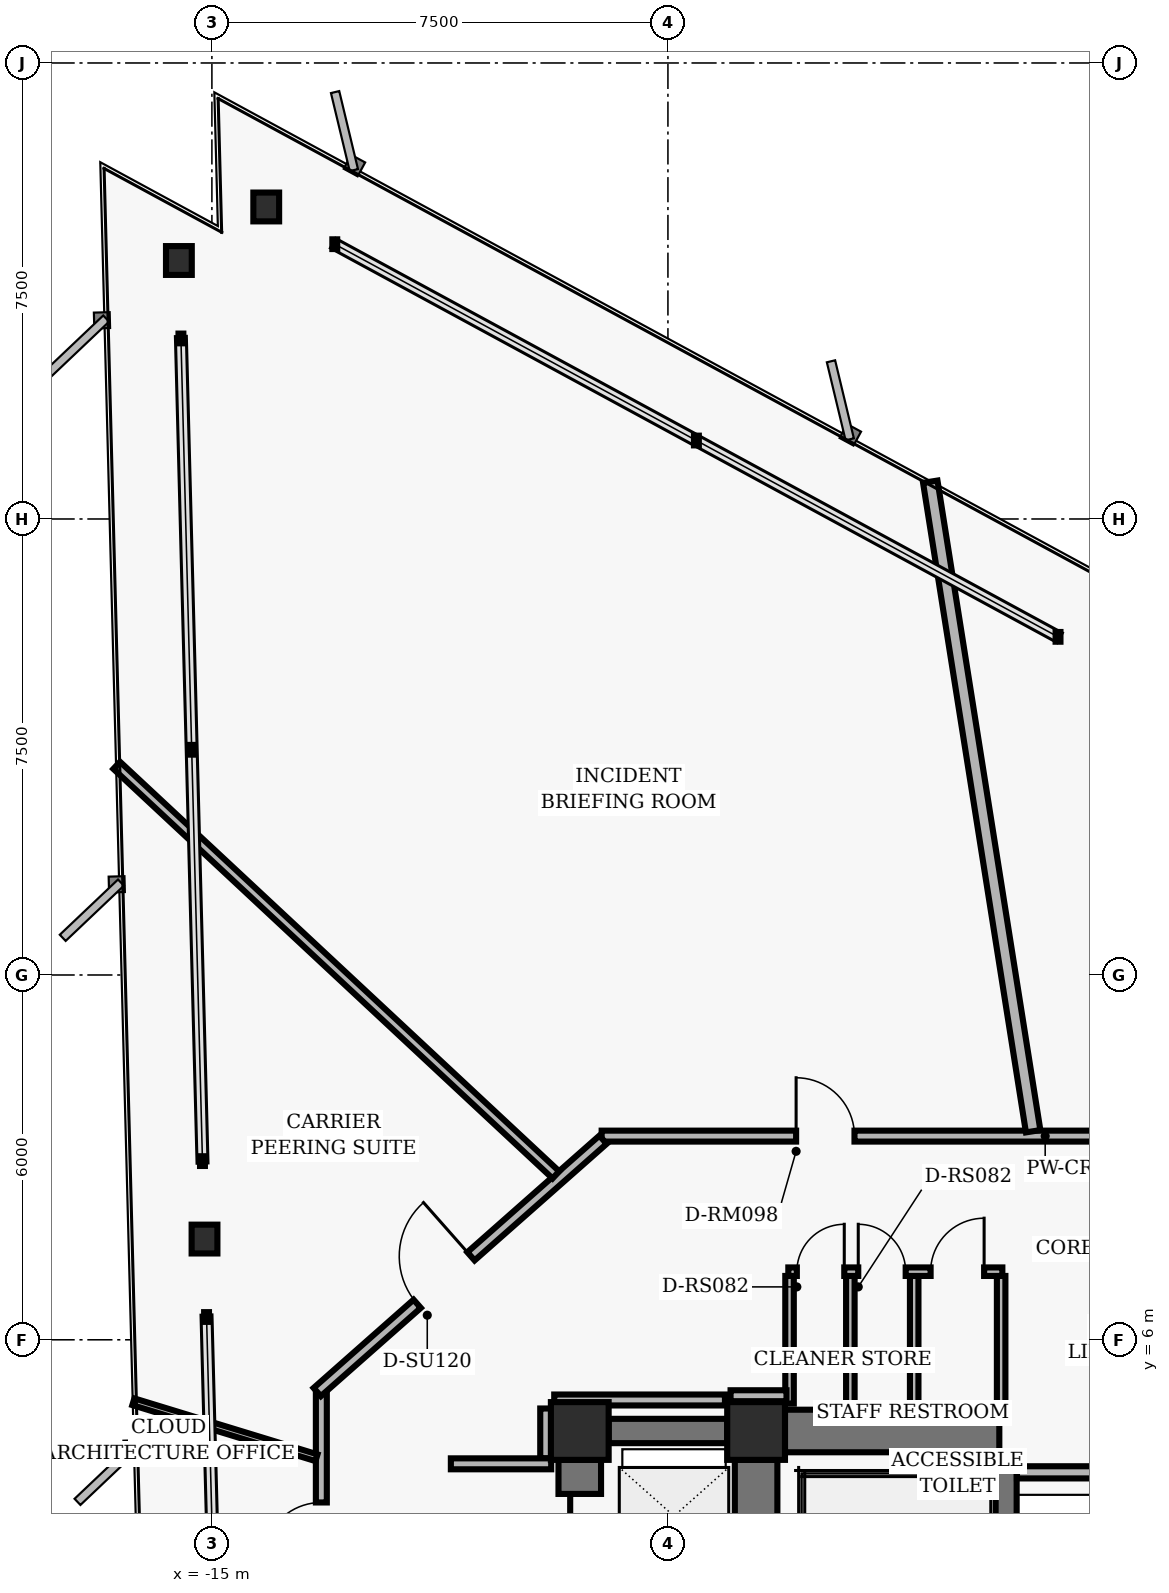
"""IFC4 building model, lengths in metres.
Left out: names, types, materials, properties, quantities, classifications, styles, units other than length and angle.
Written with IfcOpenShell. Run it as: python <this file> out.ifc"""

import sys

from ifc_helpers import new_model, si_unit, direction, frame, frame_2d, origin, origin_2d, place, context, subcontext, project, spatial, rectangle, hollow_rectangle, i_section, extrude, element, fill, save


model = new_model("IFC4")
c1 = context("Model", 3, precision=1e-05, world=origin(), true_north=direction((0.0, 1.0)))
c2 = subcontext(c1, "Body", "Model", "MODEL_VIEW")
j1 = project(units=[si_unit("LENGTHUNIT", "METRE"), si_unit("PLANEANGLEUNIT", "RADIAN")], contexts=[c1])
p1 = place(None, origin())
s1 = spatial("IfcSite", under=j1, at=p1, CompositionType="ELEMENT")
p2 = place(p1, origin())
s2 = spatial("IfcBuilding", under=s1, at=p2, CompositionType="ELEMENT")
p3 = place(p2, frame((0.0, 0.0, 32.32)))
s3 = spatial("IfcBuildingStorey", under=s2, at=p3, CompositionType="ELEMENT", Elevation=32.32)
for number, where, z_axis, x_axis in (
    (1, (-6.05, 4.5, 0.0), (0.0, 0.0, 1.0), (1.0, 0.0, 0.0)),
    (2, (-8.95, 4.5, 0.0), (0.0, 0.0, 1.0), (1.0, 0.0, 0.0)),
):
    element("IfcColumn", number, at=place(p3, frame(where, z_axis=z_axis, x_axis=x_axis)), inside=s3, PredefinedType="COLUMN", context=c2, shape_type="SweptSolid", body=[
        extrude(hollow_rectangle(XDim=0.95, YDim=0.95, WallThickness=0.06, InnerFilletRadius=0.02, OuterFilletRadius=0.04, at=origin_2d()), origin(), (0.0, 0.0, 1.0), 3.36),
    ])
p4 = place(p3, frame((-6.05, 0.475, 0.0), z_axis=(0.0, 0.0, 1.0), x_axis=(0.0, 1.0, 0.0)))
e3 = element("IfcWall", 3, at=p4, inside=s3, PredefinedType="SHEAR", context=c2, shape_type="SweptSolid", body=[
    extrude(rectangle(XDim=3.55, YDim=0.7, at=frame_2d((1.775, 0.0))), origin(), (0.0, 0.0, 1.0), 3.098),
])
p5 = place(p3, frame((-1.94, -4.1, 0.0), z_axis=(0.0, 0.0, 1.0), x_axis=(0.0, 1.0, 0.0)))
e4 = element("IfcWall", 4, at=p5, inside=s3, PredefinedType="SHEAR", context=c2, shape_type="SweptSolid", body=[
    extrude(rectangle(XDim=8.2, YDim=0.35, at=frame_2d((4.1, 0.0))), origin(), (0.0, 0.0, 1.0), 3.098),
])
p6 = place(p3, frame((-5.575, 4.5, 0.0), z_axis=(0.0, 0.0, 1.0), x_axis=(1.0, 0.0, 0.0)))
e5 = element("IfcWall", 5, at=p6, inside=s3, PredefinedType="SHEAR", context=c2, shape_type="SweptSolid", body=[
    extrude(rectangle(XDim=3.525, YDim=0.7, at=frame_2d((1.762, 0.0))), origin(), (0.0, 0.0, 1.0), 3.098),
])
p7 = place(p3, frame((-8.95, -3.825, 0.0), z_axis=(0.0, 0.0, 1.0), x_axis=(0.0, 1.0, 0.0)))
e6 = element("IfcWall", 6, at=p7, inside=s3, PredefinedType="SHEAR", context=c2, shape_type="SweptSolid", body=[
    extrude(rectangle(XDim=7.85, YDim=0.7, at=frame_2d((3.925, 0.0))), origin(), (0.0, 0.0, 1.0), 3.098),
])
p8 = place(p7, frame((0.55, 0.0, 0.0)))
e7 = element("IfcOpeningElement", 7, at=p8, cuts=e6, PredefinedType="OPENING", context=c2, shape_type="SweptSolid", body=[
    extrude(rectangle(XDim=1.06, YDim=2.04, at=frame_2d((0.53, 1.02))), frame((0.0, 0.36, 0.0), z_axis=(0.0, -1.0, 0.0), x_axis=(1.0, 0.0, 0.0)), (0.0, 0.0, 1.0), 0.72),
])
p9 = place(p7, frame((3.395, 0.0, 0.0)))
e8 = element("IfcOpeningElement", 8, at=p9, cuts=e6, PredefinedType="OPENING", context=c2, shape_type="SweptSolid", body=[
    extrude(rectangle(XDim=1.06, YDim=2.04, at=frame_2d((0.53, 1.02))), frame((0.0, 0.36, 0.0), z_axis=(0.0, -1.0, 0.0), x_axis=(1.0, 0.0, 0.0)), (0.0, 0.0, 1.0), 0.72),
])
p10 = place(p7, frame((6.23, 0.0, 0.0)))
e9 = element("IfcOpeningElement", 9, at=p10, cuts=e6, PredefinedType="OPENING", context=c2, shape_type="SweptSolid", body=[
    extrude(rectangle(XDim=1.06, YDim=2.04, at=frame_2d((0.53, 1.02))), frame((0.0, 0.36, 0.0), z_axis=(0.0, -1.0, 0.0), x_axis=(1.0, 0.0, 0.0)), (0.0, 0.0, 1.0), 0.72),
])
p11 = place(p3, frame((-8.475, 4.5, 0.0), z_axis=(0.0, 0.0, 1.0), x_axis=(1.0, 0.0, 0.0)))
e10 = element("IfcWall", 10, at=p11, inside=s3, PredefinedType="SHEAR", context=c2, shape_type="SweptSolid", body=[
    extrude(rectangle(XDim=1.95, YDim=0.4, at=frame_2d((0.975, 0.0))), origin(), (0.0, 0.0, 1.0), 3.098),
])
for number, where, z_axis, x_axis in (
    (11, (-14.106, 24.632, 0.0), (0.0, 0.0, 1.0), (1.0, 0.0, 0.0)),
    (12, (-15.543, 23.751, 0.0), (0.0, 0.0, 1.0), (1.0, 0.0, 0.0)),
    (13, (-15.121, 7.657, 0.0), (0.0, 0.0, 1.0), (1.0, 0.0, 0.0)),
):
    element("IfcColumn", number, at=place(p3, frame(where, z_axis=z_axis, x_axis=x_axis)), inside=s3, PredefinedType="COLUMN", context=c2, shape_type="SweptSolid", body=[
        extrude(i_section(OverallWidth=0.424, OverallDepth=0.474, WebThickness=0.048, FlangeThickness=0.077, FilletRadius=0.025, at=origin_2d()), origin(), (0.0, 0.0, 1.0), 3.36),
    ])
p12 = place(p3, frame((-1.76, 3.82, 0.0), z_axis=(0.0, 0.0, 1.0), x_axis=(1.0, 0.0, 0.0)))
e14 = element("IfcWall", 14, at=p12, inside=s3, PredefinedType="PARTITIONING", context=c2, shape_type="SweptSolid", body=[
    extrude(rectangle(XDim=3.52, YDim=0.2, at=frame_2d((1.76, 0.0))), origin(), (0.0, 0.0, 1.0), 3.073),
])
for number, where, z_axis, x_axis in (
    (15, (-5.5, 4.95, 0.0), (0.0, 0.0, 1.0), (0.0, 1.0, 0.0)),
    (16, (-4.5, 4.95, 0.0), (0.0, 0.0, 1.0), (0.0, 1.0, 0.0)),
    (17, (-3.45, 4.95, 0.0), (0.0, 0.0, 1.0), (0.0, 1.0, 0.0)),
    (18, (-2.02, 4.95, 0.0), (0.0, 0.0, 1.0), (0.0, 1.0, 0.0)),
):
    element("IfcWall", number, at=place(p3, frame(where, z_axis=z_axis, x_axis=x_axis)), inside=s3, PredefinedType="PARTITIONING", context=c2, shape_type="SweptSolid", body=[
        extrude(rectangle(XDim=2.1, YDim=0.14, at=frame_2d((1.05, 0.0))), origin(), (0.0, 0.0, 1.0), 3.073),
    ])
p13 = place(p3, frame((-5.52, 7.12, 0.0), z_axis=(0.0, 0.0, 1.0), x_axis=(1.0, 0.0, 0.0)))
e19 = element("IfcWall", 19, at=p13, inside=s3, PredefinedType="PARTITIONING", context=c2, shape_type="SweptSolid", body=[
    extrude(rectangle(XDim=3.52, YDim=0.14, at=frame_2d((1.76, 0.0))), origin(), (0.0, 0.0, 1.0), 3.073),
])
p14 = place(p13, frame((0.14, 0.0, 0.0)))
e20 = element("IfcOpeningElement", 20, at=p14, cuts=e19, PredefinedType="OPENING", context=c2, shape_type="SweptSolid", body=[
    extrude(rectangle(XDim=0.78, YDim=2.01, at=frame_2d((0.39, 1.005))), frame((0.0, 0.08, 0.0), z_axis=(0.0, -1.0, 0.0), x_axis=(1.0, 0.0, 0.0)), (0.0, 0.0, 1.0), 0.16),
])
p15 = place(p13, frame((1.15, 0.0, 0.0)))
e21 = element("IfcOpeningElement", 21, at=p15, cuts=e19, PredefinedType="OPENING", context=c2, shape_type="SweptSolid", body=[
    extrude(rectangle(XDim=0.78, YDim=2.01, at=frame_2d((0.39, 1.005))), frame((0.0, 0.08, 0.0), z_axis=(0.0, -1.0, 0.0), x_axis=(1.0, 0.0, 0.0)), (0.0, 0.0, 1.0), 0.16),
])
p16 = place(p13, frame((2.34, 0.0, 0.0)))
e22 = element("IfcOpeningElement", 22, at=p16, cuts=e19, PredefinedType="OPENING", context=c2, shape_type="SweptSolid", body=[
    extrude(rectangle(XDim=0.88, YDim=2.02, at=frame_2d((0.44, 1.01))), frame((0.0, 0.08, 0.0), z_axis=(0.0, -1.0, 0.0), x_axis=(1.0, 0.0, 0.0)), (0.0, 0.0, 1.0), 0.16),
])
p17 = place(p3, frame((-8.59, 9.35, 0.0), z_axis=(0.0, 0.0, 1.0), x_axis=(1.0, 0.0, 0.0)))
e23 = element("IfcWall", 23, at=p17, inside=s3, PredefinedType="PARTITIONING", context=c2, shape_type="SweptSolid", body=[
    extrude(rectangle(XDim=17.18, YDim=0.18, at=frame_2d((8.59, 0.0))), origin(), (0.0, 0.0, 1.0), 2.587),
])
p18 = place(p17, frame((10.43, 0.0, 0.0)))
e24 = element("IfcOpeningElement", 24, at=p18, cuts=e23, PredefinedType="OPENING", context=c2, shape_type="SweptSolid", body=[
    extrude(rectangle(XDim=0.96, YDim=2.02, at=frame_2d((0.48, 1.01))), frame((0.0, 0.1, 0.0), z_axis=(0.0, -1.0, 0.0), x_axis=(1.0, 0.0, 0.0)), (0.0, 0.0, 1.0), 0.2),
])
p19 = place(p17, frame((3.198, 0.0, 0.0)))
e25 = element("IfcOpeningElement", 25, at=p19, cuts=e23, PredefinedType="OPENING", context=c2, shape_type="SweptSolid", body=[
    extrude(rectangle(XDim=0.96, YDim=2.02, at=frame_2d((0.48, 1.01))), frame((0.0, 0.1, 0.0), z_axis=(0.0, -1.0, 0.0), x_axis=(1.0, 0.0, 0.0)), (0.0, 0.0, 1.0), 0.2),
])
p20 = place(p3, frame((-13.2, -5.11, 0.0), z_axis=(0.0, 0.0, 1.0), x_axis=(0.0, 1.0, 0.0)))
e26 = element("IfcWall", 26, at=p20, inside=s3, PredefinedType="PARTITIONING", context=c2, shape_type="SweptSolid", body=[
    extrude(rectangle(XDim=10.22, YDim=0.18, at=frame_2d((5.11, 0.0))), origin(), (0.0, 0.0, 1.0), 2.587),
])
p21 = place(p20, frame((3.02, 0.0, 0.0)))
e27 = element("IfcOpeningElement", 27, at=p21, cuts=e26, PredefinedType="OPENING", context=c2, shape_type="SweptSolid", body=[
    extrude(rectangle(XDim=0.96, YDim=2.02, at=frame_2d((0.48, 1.01))), frame((0.0, 0.1, 0.0), z_axis=(0.0, -1.0, 0.0), x_axis=(1.0, 0.0, 0.0)), (0.0, 0.0, 1.0), 0.2),
])
p22 = place(p20, frame((7.474, 0.0, 0.0)))
e28 = element("IfcOpeningElement", 28, at=p22, cuts=e26, PredefinedType="OPENING", context=c2, shape_type="SweptSolid", body=[
    extrude(rectangle(XDim=0.96, YDim=2.02, at=frame_2d((0.48, 1.01))), frame((0.0, 0.1, 0.0), z_axis=(0.0, -1.0, 0.0), x_axis=(1.0, 0.0, 0.0)), (0.0, 0.0, 1.0), 0.2),
])
p23 = place(p3, frame((-13.268, 5.14, 0.0), z_axis=(0.0, 0.0, 1.0), x_axis=(0.749626463267, 0.66186113768, 0.0)))
e29 = element("IfcWall", 29, at=p23, inside=s3, PredefinedType="PARTITIONING", context=c2, shape_type="SweptSolid", body=[
    extrude(rectangle(XDim=6.27, YDim=0.18, at=frame_2d((3.135, 0.0))), origin(), (0.0, 0.0, 1.0), 3.073),
])
p24 = place(p23, frame((2.193, 0.0, 0.0)))
e30 = element("IfcOpeningElement", 30, at=p24, cuts=e29, PredefinedType="OPENING", context=c2, shape_type="SweptSolid", body=[
    extrude(rectangle(XDim=1.18, YDim=2.02, at=frame_2d((0.59, 1.01))), frame((0.0, 0.1, 0.0), z_axis=(0.0, -1.0, 0.0), x_axis=(1.0, 0.0, 0.0)), (0.0, 0.0, 1.0), 0.2),
])
p25 = place(p3, frame((-9.51, 4.87, 0.0), z_axis=(0.0, 0.0, 1.0), x_axis=(0.0, -1.0, 0.0)))
e31 = element("IfcWall", 31, at=p25, inside=s3, PredefinedType="PARTITIONING", context=c2, shape_type="SweptSolid", body=[
    extrude(rectangle(XDim=0.82, YDim=0.18, at=frame_2d((0.41, 0.0))), origin(), (0.0, 0.0, 1.0), 3.073),
])
p26 = place(p3, frame((-9.42, 3.96, 0.0), z_axis=(0.0, 0.0, 1.0), x_axis=(-1.0, 0.0, 0.0)))
e32 = element("IfcWall", 32, at=p26, inside=s3, PredefinedType="PARTITIONING", context=c2, shape_type="SweptSolid", body=[
    extrude(rectangle(XDim=1.65, YDim=0.18, at=frame_2d((0.825, 0.0))), origin(), (0.0, 0.0, 1.0), 3.073),
])
p27 = place(p3, frame((-5.55, 5.08, 0.0), z_axis=(0.0, 0.0, 1.0), x_axis=(-1.0, 0.0, 0.0)))
e33 = element("IfcWall", 33, at=p27, inside=s3, PredefinedType="PARTITIONING", context=c2, shape_type="SweptSolid", body=[
    extrude(rectangle(XDim=0.92, YDim=0.18, at=frame_2d((0.46, 0.0))), origin(), (0.0, 0.0, 1.0), 3.073),
])
p28 = place(p3, frame((-6.562, 5.01, 0.0), z_axis=(0.0, 0.0, 1.0), x_axis=(-1.0, 0.0, 0.0)))
e34 = element("IfcWall", 34, at=p28, inside=s3, PredefinedType="PARTITIONING", context=c2, shape_type="SweptSolid", body=[
    extrude(rectangle(XDim=2.808, YDim=0.18, at=frame_2d((1.404, 0.0))), origin(), (0.0, 0.0, 1.0), 3.073),
])
p29 = place(p3, frame((-1.494, 9.43, 0.0), z_axis=(0.0, 0.0, 1.0), x_axis=(-0.156418067091, 0.987690937636, 0.0)))
e35 = element("IfcWall", 35, at=p29, inside=s3, PredefinedType="PARTITIONING", context=c2, shape_type="SweptSolid", body=[
    extrude(rectangle(XDim=10.816, YDim=0.24, at=frame_2d((5.408, 0.0))), origin(), (0.0, 0.0, 1.0), 3.073),
])
p30 = place(p3, frame((-9.343, 8.712, 0.0), z_axis=(0.0, 0.0, 1.0), x_axis=(-0.731347028882, 0.682005515627, 0.0)))
e36 = element("IfcWall", 36, at=p30, inside=s3, PredefinedType="PARTITIONING", context=c2, shape_type="SweptSolid", body=[
    extrude(rectangle(XDim=9.876, YDim=0.16, at=frame_2d((4.938, 0.0))), origin(), (0.0, 0.0, 1.0), 3.073),
])
p31 = place(p3, frame((-13.28, 4.06, 0.0), z_axis=(0.0, 0.0, 1.0), x_axis=(-0.956293781209, 0.292407599118, 0.0)))
e37 = element("IfcWall", 37, at=p31, inside=s3, PredefinedType="MOVABLE", context=c2, shape_type="SweptSolid", body=[
    extrude(rectangle(XDim=3.149, YDim=0.115, at=frame_2d((1.575, 0.0))), origin(), (0.0, 0.0, 1.0), 3.073),
])
p32 = place(p14, origin())
e38 = element("IfcDoor", 38, at=p32, inside=s3, OperationType="SINGLE_SWING_RIGHT", PredefinedType="DOOR", context=c2, shape_type="SweptSolid", body=[
    extrude(rectangle(XDim=0.78, YDim=2.01, at=frame_2d((0.39, 1.005))), frame((0.0, 0.025, 0.0), z_axis=(0.0, -1.0, 0.0), x_axis=(1.0, 0.0, 0.0)), (0.0, 0.0, 1.0), 0.05),
])
fill(e20, e38)
p33 = place(p15, origin())
e39 = element("IfcDoor", 39, at=p33, inside=s3, OperationType="SINGLE_SWING_LEFT", PredefinedType="DOOR", context=c2, shape_type="SweptSolid", body=[
    extrude(rectangle(XDim=0.78, YDim=2.01, at=frame_2d((0.39, 1.005))), frame((0.0, 0.025, 0.0), z_axis=(0.0, -1.0, 0.0), x_axis=(1.0, 0.0, 0.0)), (0.0, 0.0, 1.0), 0.05),
])
fill(e21, e39)
p34 = place(p16, origin())
e40 = element("IfcDoor", 40, at=p34, inside=s3, OperationType="SINGLE_SWING_RIGHT", PredefinedType="DOOR", context=c2, shape_type="SweptSolid", body=[
    extrude(rectangle(XDim=0.88, YDim=2.02, at=frame_2d((0.44, 1.01))), frame((0.0, 0.025, 0.0), z_axis=(0.0, -1.0, 0.0), x_axis=(1.0, 0.0, 0.0)), (0.0, 0.0, 1.0), 0.05),
])
fill(e22, e40)
p35 = place(p10, origin())
e41 = element("IfcDoor", 41, at=p35, inside=s3, OperationType="SLIDING_TO_LEFT", PredefinedType="DOOR", context=c2, shape_type="SweptSolid", body=[
    extrude(rectangle(XDim=1.06, YDim=2.04, at=frame_2d((0.53, 1.02))), frame((0.0, 0.025, 0.0), z_axis=(0.0, -1.0, 0.0), x_axis=(1.0, 0.0, 0.0)), (0.0, 0.0, 1.0), 0.05),
])
fill(e9, e41)
p36 = place(p19, origin())
e42 = element("IfcDoor", 42, at=p36, inside=s3, OperationType="SINGLE_SWING_LEFT", PredefinedType="DOOR", context=c2, shape_type="SweptSolid", body=[
    extrude(rectangle(XDim=0.96, YDim=2.02, at=frame_2d((0.48, 1.01))), frame((0.0, 0.025, 0.0), z_axis=(0.0, -1.0, 0.0), x_axis=(1.0, 0.0, 0.0)), (0.0, 0.0, 1.0), 0.05),
])
fill(e25, e42)
p37 = place(p24, origin())
e43 = element("IfcDoor", 43, at=p37, inside=s3, OperationType="SINGLE_SWING_RIGHT", PredefinedType="DOOR", context=c2, shape_type="SweptSolid", body=[
    extrude(rectangle(XDim=1.18, YDim=2.02, at=frame_2d((0.59, 1.01))), frame((0.0, 0.025, 0.0), z_axis=(0.0, -1.0, 0.0), x_axis=(1.0, 0.0, 0.0)), (0.0, 0.0, 1.0), 0.05),
])
fill(e30, e43)
p38 = place(p22, origin())
e44 = element("IfcDoor", 44, at=p38, inside=s3, OperationType="SINGLE_SWING_LEFT", PredefinedType="DOOR", context=c2, shape_type="SweptSolid", body=[
    extrude(rectangle(XDim=0.96, YDim=2.02, at=frame_2d((0.48, 1.01))), frame((0.0, 0.025, 0.0), z_axis=(0.0, -1.0, 0.0), x_axis=(1.0, 0.0, 0.0)), (0.0, 0.0, 1.0), 0.05),
])
fill(e28, e44)
save(model, sys.argv[1])
